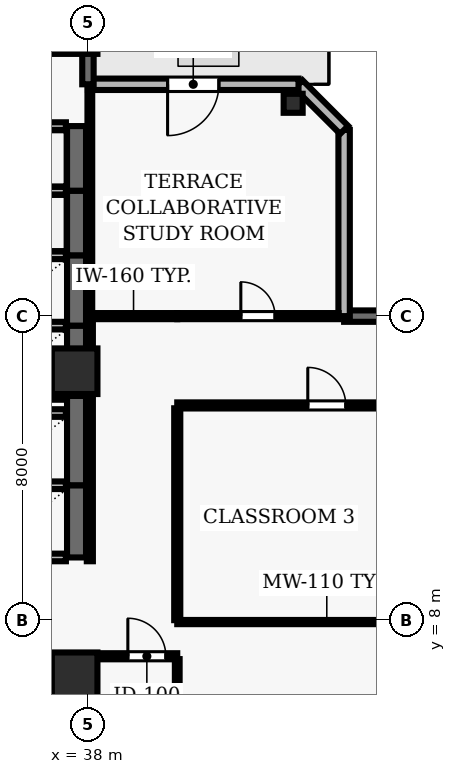
"""IFC4 building model, lengths in metres.
Left out: names, types, materials, properties, quantities, classifications, styles, units other than length and angle.
Written with IfcOpenShell. Run it as: python <this file> out.ifc"""

import sys

from ifc_helpers import new_model, si_unit, direction, frame, frame_2d, origin, origin_2d, place, context, subcontext, project, spatial, rectangle, hollow_rectangle, extrude, element, fill, save


model = new_model("IFC4")
c1 = context("Model", 3, precision=1e-05, world=origin(), true_north=direction((0.0, 1.0)))
c2 = subcontext(c1, "Body", "Model", "MODEL_VIEW")
j1 = project(units=[si_unit("LENGTHUNIT", "METRE"), si_unit("PLANEANGLEUNIT", "RADIAN")], contexts=[c1])
p1 = place(None, origin())
s1 = spatial("IfcSite", under=j1, at=p1, CompositionType="ELEMENT")
p2 = place(p1, origin())
s2 = spatial("IfcBuilding", under=s1, at=p2, CompositionType="ELEMENT")
p3 = place(p2, frame((0.0, 0.0, 158.0)))
s3 = spatial("IfcBuildingStorey", under=s2, at=p3, CompositionType="ELEMENT", Elevation=158.0)
for number, where, z_axis, x_axis in (
    (1, (37.65, 6.55, 0.0), (0.0, 0.0, 1.0), (1.0, 0.0, 0.0)),
    (2, (37.65, 14.55, 0.0), (0.0, 0.0, 1.0), (1.0, 0.0, 0.0)),
    (3, (37.65, 23.5, 0.0), (0.0, 0.0, 1.0), (1.0, 0.0, 0.0)),
):
    element("IfcColumn", number, at=place(p3, frame(where, z_axis=z_axis, x_axis=x_axis)), inside=s3, PredefinedType="COLUMN", context=c2, shape_type="SweptSolid", body=[
        extrude(rectangle(XDim=1.2, YDim=1.2, at=origin_2d()), origin(), (0.0, 0.0, 1.0), 3.9),
    ])
p4 = place(p3, frame((43.4, 21.6, 0.0), z_axis=(0.0, 0.0, 1.0), x_axis=(1.0, 0.0, 0.0)))
e4 = element("IfcColumn", 4, at=p4, inside=s3, PredefinedType="COLUMN", context=c2, shape_type="SweptSolid", body=[
    extrude(hollow_rectangle(XDim=0.5, YDim=0.5, WallThickness=0.025, at=origin_2d()), origin(), (0.0, 0.0, 1.0), 3.9),
])
p5 = place(p3, frame((68.1, 16.0, 0.0), z_axis=(0.0, 0.0, 1.0), x_axis=(-1.0, 0.0, 0.0)))
e5 = element("IfcWall", 5, at=p5, inside=s3, PredefinedType="SOLIDWALL", context=c2, shape_type="SweptSolid", body=[
    extrude(rectangle(XDim=23.359, YDim=0.3, at=frame_2d((11.68, 0.0))), origin(), (0.0, 0.0, 1.0), 3.69),
])
p6 = place(p5, frame((11.853, 0.0, 0.0)))
e6 = element("IfcOpeningElement", 6, at=p6, cuts=e5, PredefinedType="OPENING", context=c2, shape_type="SweptSolid", body=[
    extrude(rectangle(XDim=1.0, YDim=2.2, at=frame_2d((0.5, 1.1))), frame((0.0, 0.16, 0.0), z_axis=(0.0, -1.0, 0.0), x_axis=(1.0, 0.0, 0.0)), (0.0, 0.0, 1.0), 0.32),
])
p7 = place(p5, frame((2.02, 0.0, 0.9)))
e7 = element("IfcOpeningElement", 7, at=p7, cuts=e5, PredefinedType="OPENING", context=c2, shape_type="SweptSolid", body=[
    extrude(rectangle(XDim=1.8, YDim=1.8, at=frame_2d((0.9, 0.9))), frame((0.0, 0.16, 0.0), z_axis=(0.0, -1.0, 0.0), x_axis=(1.0, 0.0, 0.0)), (0.0, 0.0, 1.0), 0.32),
])
p8 = place(p5, frame((7.86, 0.0, 0.9)))
e8 = element("IfcOpeningElement", 8, at=p8, cuts=e5, PredefinedType="OPENING", context=c2, shape_type="SweptSolid", body=[
    extrude(rectangle(XDim=1.8, YDim=1.8, at=frame_2d((0.9, 0.9))), frame((0.0, 0.16, 0.0), z_axis=(0.0, -1.0, 0.0), x_axis=(1.0, 0.0, 0.0)), (0.0, 0.0, 1.0), 0.32),
])
p9 = place(p5, frame((13.699, 0.0, 0.9)))
e9 = element("IfcOpeningElement", 9, at=p9, cuts=e5, PredefinedType="OPENING", context=c2, shape_type="SweptSolid", body=[
    extrude(rectangle(XDim=1.8, YDim=1.8, at=frame_2d((0.9, 0.9))), frame((0.0, 0.16, 0.0), z_axis=(0.0, -1.0, 0.0), x_axis=(1.0, 0.0, 0.0)), (0.0, 0.0, 1.0), 0.32),
])
p10 = place(p5, frame((19.539, 0.0, 0.9)))
e10 = element("IfcOpeningElement", 10, at=p10, cuts=e5, PredefinedType="OPENING", context=c2, shape_type="SweptSolid", body=[
    extrude(rectangle(XDim=1.8, YDim=1.8, at=frame_2d((0.9, 0.9))), frame((0.0, 0.16, 0.0), z_axis=(0.0, -1.0, 0.0), x_axis=(1.0, 0.0, 0.0)), (0.0, 0.0, 1.0), 0.32),
])
p11 = place(p3, frame((44.741, 16.0, 0.0), z_axis=(0.0, 0.0, 1.0), x_axis=(0.0, 1.0, 0.0)))
e11 = element("IfcWall", 11, at=p11, inside=s3, PredefinedType="SOLIDWALL", context=c2, shape_type="SweptSolid", body=[
    extrude(rectangle(XDim=4.9, YDim=0.3, at=frame_2d((2.45, 0.0))), origin(), (0.0, 0.0, 1.0), 3.69),
])
p12 = place(p3, frame((44.741, 20.9, 0.0), z_axis=(0.0, 0.0, 1.0), x_axis=(-0.707034851297, 0.707178703759, 0.0)))
e12 = element("IfcWall", 12, at=p12, inside=s3, PredefinedType="SOLIDWALL", context=c2, shape_type="SweptSolid", body=[
    extrude(rectangle(XDim=1.697, YDim=0.3, at=frame_2d((0.849, 0.0))), origin(), (0.0, 0.0, 1.0), 3.69),
])
p13 = place(p3, frame((43.541, 22.1, 0.0), z_axis=(0.0, 0.0, 1.0), x_axis=(-1.0, 0.0, 0.0)))
e13 = element("IfcWall", 13, at=p13, inside=s3, PredefinedType="SOLIDWALL", context=c2, shape_type="SweptSolid", body=[
    extrude(rectangle(XDim=5.541, YDim=0.3, at=frame_2d((2.771, 0.0))), origin(), (0.0, 0.0, 1.0), 3.69),
])
p14 = place(p13, frame((2.095, 0.0, 0.0)))
e14 = element("IfcOpeningElement", 14, at=p14, cuts=e13, PredefinedType="OPENING", context=c2, shape_type="SweptSolid", body=[
    extrude(rectangle(XDim=1.35, YDim=2.2, at=frame_2d((0.675, 1.1))), frame((0.0, 0.16, 0.0), z_axis=(0.0, -1.0, 0.0), x_axis=(1.0, 0.0, 0.0)), (0.0, 0.0, 1.0), 0.32),
])
p15 = place(p3, frame((38.0, 22.1, 0.0), z_axis=(0.0, 0.0, 1.0), x_axis=(0.0, 1.0, 0.0)))
e15 = element("IfcWall", 15, at=p15, inside=s3, PredefinedType="SOLIDWALL", context=c2, shape_type="SweptSolid", body=[
    extrude(rectangle(XDim=24.0, YDim=0.3, at=frame_2d((12.0, 0.0))), origin(), (0.0, 0.0, 1.0), 3.69),
])
p16 = place(p15, frame((10.125, 0.0, 0.0)))
e16 = element("IfcOpeningElement", 16, at=p16, cuts=e15, PredefinedType="OPENING", context=c2, shape_type="SweptSolid", body=[
    extrude(rectangle(XDim=1.0, YDim=2.2, at=frame_2d((0.5, 1.1))), frame((0.0, 0.16, 0.0), z_axis=(0.0, -1.0, 0.0), x_axis=(1.0, 0.0, 0.0)), (0.0, 0.0, 1.0), 0.32),
])
p17 = place(p15, frame((14.25, 0.0, 0.9)))
e17 = element("IfcOpeningElement", 17, at=p17, cuts=e15, PredefinedType="OPENING", context=c2, shape_type="SweptSolid", body=[
    extrude(rectangle(XDim=2.4, YDim=2.2, at=frame_2d((1.2, 1.1))), frame((0.0, 0.16, 0.0), z_axis=(0.0, -1.0, 0.0), x_axis=(1.0, 0.0, 0.0)), (0.0, 0.0, 1.0), 0.32),
])
p18 = place(p15, frame((19.8, 0.0, 0.9)))
e18 = element("IfcOpeningElement", 18, at=p18, cuts=e15, PredefinedType="OPENING", context=c2, shape_type="SweptSolid", body=[
    extrude(rectangle(XDim=2.4, YDim=2.2, at=frame_2d((1.2, 1.1))), frame((0.0, 0.16, 0.0), z_axis=(0.0, -1.0, 0.0), x_axis=(1.0, 0.0, 0.0)), (0.0, 0.0, 1.0), 0.32),
])
p19 = place(p3, frame((37.7, 4.7, 0.0), z_axis=(0.0, 0.0, 1.0), x_axis=(0.0, 1.0, 0.0)))
e19 = element("IfcWall", 19, at=p19, inside=s3, PredefinedType="SHEAR", context=c2, shape_type="SweptSolid", body=[
    extrude(rectangle(XDim=2.25, YDim=0.5, at=frame_2d((1.125, 0.0))), origin(), (0.0, 0.0, 1.0), 3.69),
])
p20 = place(p3, frame((37.42, 6.95, 0.0), z_axis=(0.0, 0.0, 1.0), x_axis=(-1.0, 0.0, 0.0)))
e20 = element("IfcWall", 20, at=p20, inside=s3, PredefinedType="SOLIDWALL", context=c2, shape_type="SweptSolid", body=[
    extrude(rectangle(XDim=2.14, YDim=0.2, at=frame_2d((1.07, 0.0))), origin(), (0.0, 0.0, 1.0), 3.69),
])
p21 = place(p3, frame((37.7, 9.65, 0.0), z_axis=(0.0, 0.0, 1.0), x_axis=(0.0, 1.0, 0.0)))
e21 = element("IfcWall", 21, at=p21, inside=s3, PredefinedType="SHEAR", context=c2, shape_type="SweptSolid", body=[
    extrude(rectangle(XDim=1.9, YDim=0.5, at=frame_2d((0.95, 0.0))), origin(), (0.0, 0.0, 1.0), 3.69),
])
for number, where, z_axis, x_axis in (
    (22, (35.28, 9.65, 0.0), (0.0, 0.0, 1.0), (1.0, 0.0, 0.0)),
    (23, (37.42, 11.55, 0.0), (0.0, 0.0, 1.0), (-1.0, 0.0, 0.0)),
):
    element("IfcWall", number, at=place(p3, frame(where, z_axis=z_axis, x_axis=x_axis)), inside=s3, PredefinedType="SOLIDWALL", context=c2, shape_type="SweptSolid", body=[
        extrude(rectangle(XDim=2.14, YDim=0.2, at=frame_2d((1.07, 0.0))), origin(), (0.0, 0.0, 1.0), 3.69),
    ])
p22 = place(p3, frame((37.7, 11.55, 0.0), z_axis=(0.0, 0.0, 1.0), x_axis=(0.0, 1.0, 0.0)))
e24 = element("IfcWall", 24, at=p22, inside=s3, PredefinedType="SHEAR", context=c2, shape_type="SweptSolid", body=[
    extrude(rectangle(XDim=2.35, YDim=0.5, at=frame_2d((1.175, 0.0))), origin(), (0.0, 0.0, 1.0), 3.69),
])
p23 = place(p3, frame((37.42, 13.45, 0.0), z_axis=(0.0, 0.0, 1.0), x_axis=(-1.0, 0.0, 0.0)))
e25 = element("IfcWall", 25, at=p23, inside=s3, PredefinedType="SOLIDWALL", context=c2, shape_type="SweptSolid", body=[
    extrude(rectangle(XDim=2.14, YDim=0.2, at=frame_2d((1.07, 0.0))), origin(), (0.0, 0.0, 1.0), 3.69),
])
p24 = place(p3, frame((37.7, 13.9, 0.0), z_axis=(0.0, 0.0, 1.0), x_axis=(0.0, 1.0, 0.0)))
e26 = element("IfcWall", 26, at=p24, inside=s3, PredefinedType="SHEAR", context=c2, shape_type="SweptSolid", body=[
    extrude(rectangle(XDim=1.85, YDim=0.5, at=frame_2d((0.925, 0.0))), origin(), (0.0, 0.0, 1.0), 3.69),
])
for number, where, z_axis, x_axis in (
    (27, (35.28, 13.9, 0.0), (0.0, 0.0, 1.0), (1.0, 0.0, 0.0)),
    (28, (37.42, 15.75, 0.0), (0.0, 0.0, 1.0), (-1.0, 0.0, 0.0)),
):
    element("IfcWall", number, at=place(p3, frame(where, z_axis=z_axis, x_axis=x_axis)), inside=s3, PredefinedType="SOLIDWALL", context=c2, shape_type="SweptSolid", body=[
        extrude(rectangle(XDim=2.14, YDim=0.2, at=frame_2d((1.07, 0.0))), origin(), (0.0, 0.0, 1.0), 3.69),
    ])
p25 = place(p3, frame((37.7, 15.75, 0.0), z_axis=(0.0, 0.0, 1.0), x_axis=(0.0, 1.0, 0.0)))
e29 = element("IfcWall", 29, at=p25, inside=s3, PredefinedType="SHEAR", context=c2, shape_type="SweptSolid", body=[
    extrude(rectangle(XDim=1.85, YDim=0.5, at=frame_2d((0.925, 0.0))), origin(), (0.0, 0.0, 1.0), 3.69),
])
p26 = place(p3, frame((37.42, 17.6, 0.0), z_axis=(0.0, 0.0, 1.0), x_axis=(-1.0, 0.0, 0.0)))
e30 = element("IfcWall", 30, at=p26, inside=s3, PredefinedType="SOLIDWALL", context=c2, shape_type="SweptSolid", body=[
    extrude(rectangle(XDim=2.14, YDim=0.2, at=frame_2d((1.07, 0.0))), origin(), (0.0, 0.0, 1.0), 3.69),
])
p27 = place(p3, frame((37.7, 17.6, 0.0), z_axis=(0.0, 0.0, 1.0), x_axis=(0.0, 1.0, 0.0)))
e31 = element("IfcWall", 31, at=p27, inside=s3, PredefinedType="SHEAR", context=c2, shape_type="SweptSolid", body=[
    extrude(rectangle(XDim=1.7, YDim=0.5, at=frame_2d((0.85, 0.0))), origin(), (0.0, 0.0, 1.0), 3.69),
])
p28 = place(p3, frame((37.42, 19.3, 0.0), z_axis=(0.0, 0.0, 1.0), x_axis=(-1.0, 0.0, 0.0)))
e32 = element("IfcWall", 32, at=p28, inside=s3, PredefinedType="SOLIDWALL", context=c2, shape_type="SweptSolid", body=[
    extrude(rectangle(XDim=2.14, YDim=0.2, at=frame_2d((1.07, 0.0))), origin(), (0.0, 0.0, 1.0), 3.69),
])
p29 = place(p3, frame((37.7, 19.3, 0.0), z_axis=(0.0, 0.0, 1.0), x_axis=(0.0, 1.0, 0.0)))
e33 = element("IfcWall", 33, at=p29, inside=s3, PredefinedType="SHEAR", context=c2, shape_type="SweptSolid", body=[
    extrude(rectangle(XDim=1.7, YDim=0.5, at=frame_2d((0.85, 0.0))), origin(), (0.0, 0.0, 1.0), 3.69),
])
p30 = place(p3, frame((37.42, 21.0, 0.0), z_axis=(0.0, 0.0, 1.0), x_axis=(-1.0, 0.0, 0.0)))
e34 = element("IfcWall", 34, at=p30, inside=s3, PredefinedType="SOLIDWALL", context=c2, shape_type="SweptSolid", body=[
    extrude(rectangle(XDim=2.14, YDim=0.2, at=frame_2d((1.07, 0.0))), origin(), (0.0, 0.0, 1.0), 3.69),
])
p31 = place(p3, frame((38.05, 7.05, 0.0), z_axis=(0.0, 0.0, 1.0), x_axis=(1.0, 0.0, 0.0)))
e35 = element("IfcWall", 35, at=p31, inside=s3, PredefinedType="PARTITIONING", context=c2, shape_type="SweptSolid", body=[
    extrude(rectangle(XDim=2.3, YDim=0.16, at=frame_2d((1.15, 0.0))), origin(), (0.0, 0.0, 1.0), 3.69),
])
p32 = place(p31, frame((1.0, 0.0, 0.0)))
e36 = element("IfcOpeningElement", 36, at=p32, cuts=e35, PredefinedType="OPENING", context=c2, shape_type="SweptSolid", body=[
    extrude(rectangle(XDim=1.0, YDim=2.1, at=frame_2d((0.5, 1.05))), frame((0.0, 0.09, 0.0), z_axis=(0.0, -1.0, 0.0), x_axis=(1.0, 0.0, 0.0)), (0.0, 0.0, 1.0), 0.18),
])
p33 = place(p3, frame((40.35, 13.65, 0.0), z_axis=(0.0, 0.0, 1.0), x_axis=(1.0, 0.0, 0.0)))
e37 = element("IfcWall", 37, at=p33, inside=s3, PredefinedType="PARTITIONING", context=c2, shape_type="SweptSolid", body=[
    extrude(rectangle(XDim=7.87, YDim=0.16, at=frame_2d((3.935, 0.0))), origin(), (0.0, 0.0, 1.0), 3.69),
])
p34 = place(p33, frame((3.435, 0.0, 0.0)))
e38 = element("IfcOpeningElement", 38, at=p34, cuts=e37, PredefinedType="OPENING", context=c2, shape_type="SweptSolid", body=[
    extrude(rectangle(XDim=1.0, YDim=2.1, at=frame_2d((0.5, 1.05))), frame((0.0, 0.09, 0.0), z_axis=(0.0, -1.0, 0.0), x_axis=(1.0, 0.0, 0.0)), (0.0, 0.0, 1.0), 0.18),
])
p35 = place(p3, frame((40.35, 16.0, 0.0), z_axis=(0.0, 0.0, 1.0), x_axis=(-1.0, 0.0, 0.0)))
e39 = element("IfcWall", 39, at=p35, inside=s3, PredefinedType="PARTITIONING", context=c2, shape_type="SweptSolid", body=[
    extrude(rectangle(XDim=2.3, YDim=0.16, at=frame_2d((1.15, 0.0))), origin(), (0.0, 0.0, 1.0), 3.39),
])
p36 = place(p3, frame((40.35, 16.0, 0.0), z_axis=(0.0, 0.0, 1.0), x_axis=(1.0, 0.0, 0.0)))
e40 = element("IfcWall", 40, at=p36, inside=s3, PredefinedType="PARTITIONING", context=c2, shape_type="SweptSolid", body=[
    extrude(rectangle(XDim=4.246, YDim=0.16, at=frame_2d((2.123, 0.0))), origin(), (0.0, 0.0, 1.0), 3.39),
])
p37 = place(p36, frame((1.673, 0.0, 0.0)))
e41 = element("IfcOpeningElement", 41, at=p37, cuts=e40, PredefinedType="OPENING", context=c2, shape_type="SweptSolid", body=[
    extrude(rectangle(XDim=0.9, YDim=2.1, at=frame_2d((0.45, 1.05))), frame((0.0, 0.09, 0.0), z_axis=(0.0, -1.0, 0.0), x_axis=(1.0, 0.0, 0.0)), (0.0, 0.0, 1.0), 0.18),
])
p38 = place(p3, frame((48.22, 7.95, 0.0), z_axis=(0.0, 0.0, 1.0), x_axis=(-1.0, 0.0, 0.0)))
e42 = element("IfcWall", 42, at=p38, inside=s3, PredefinedType="MOVABLE", context=c2, shape_type="SweptSolid", body=[
    extrude(rectangle(XDim=7.87, YDim=0.11, at=frame_2d((3.935, 0.0))), origin(), (0.0, 0.0, 1.0), 3.074),
])
p39 = place(p3, frame((38.05, 6.975, 0.0), z_axis=(0.0, 0.0, 1.0), x_axis=(0.0, -1.0, 0.0)))
e43 = element("IfcWall", 43, at=p39, inside=s3, PredefinedType="PARTITIONING", context=c2, shape_type="SweptSolid", body=[
    extrude(rectangle(XDim=6.83, YDim=0.125, at=frame_2d((3.415, 0.0))), origin(), (0.0, 0.0, 1.0), 3.074),
])
p40 = place(p3, frame((38.05, 15.925, 0.0), z_axis=(0.0, 0.0, 1.0), x_axis=(0.0, -1.0, 0.0)))
e44 = element("IfcWall", 44, at=p40, inside=s3, PredefinedType="PARTITIONING", context=c2, shape_type="SweptSolid", body=[
    extrude(rectangle(XDim=6.375, YDim=0.16, at=frame_2d((3.188, 0.0))), origin(), (0.0, 0.0, 1.0), 3.074),
])
p41 = place(p3, frame((38.05, 21.955, 0.0), z_axis=(0.0, 0.0, 1.0), x_axis=(0.0, -1.0, 0.0)))
e45 = element("IfcWall", 45, at=p41, inside=s3, PredefinedType="PARTITIONING", context=c2, shape_type="SweptSolid", body=[
    extrude(rectangle(XDim=5.88, YDim=0.125, at=frame_2d((2.94, 0.0))), origin(), (0.0, 0.0, 1.0), 3.074),
])
p42 = place(p3, frame((40.35, 0.145, 0.0), z_axis=(0.0, 0.0, 1.0), x_axis=(0.0, 1.0, 0.0)))
e46 = element("IfcWall", 46, at=p42, inside=s3, PredefinedType="PARTITIONING", context=c2, shape_type="SweptSolid", body=[
    extrude(rectangle(XDim=6.83, YDim=0.125, at=frame_2d((3.415, 0.0))), origin(), (0.0, 0.0, 1.0), 3.69),
])
p43 = place(p42, frame((2.965, 0.0, 0.0)))
e47 = element("IfcOpeningElement", 47, at=p43, cuts=e46, PredefinedType="OPENING", context=c2, shape_type="SweptSolid", body=[
    extrude(rectangle(XDim=0.9, YDim=2.1, at=frame_2d((0.45, 1.05))), frame((0.0, 0.073, 0.0), z_axis=(0.0, -1.0, 0.0), x_axis=(1.0, 0.0, 0.0)), (0.0, 0.0, 1.0), 0.145),
])
p44 = place(p3, frame((40.35, 8.0, 0.0), z_axis=(0.0, 0.0, 1.0), x_axis=(0.0, 1.0, 0.0)))
e48 = element("IfcWall", 48, at=p44, inside=s3, PredefinedType="PARTITIONING", context=c2, shape_type="SweptSolid", body=[
    extrude(rectangle(XDim=5.575, YDim=0.16, at=frame_2d((2.788, 0.0))), origin(), (0.0, 0.0, 1.0), 3.69),
])
p45 = place(p14, origin())
e49 = element("IfcDoor", 49, at=p45, inside=s3, OperationType="SINGLE_SWING_RIGHT", PredefinedType="DOOR", context=c2, shape_type="SweptSolid", body=[
    extrude(rectangle(XDim=1.35, YDim=2.2, at=frame_2d((0.675, 1.1))), frame((0.0, 0.025, 0.0), z_axis=(0.0, -1.0, 0.0), x_axis=(1.0, 0.0, 0.0)), (0.0, 0.0, 1.0), 0.05),
])
fill(e14, e49)
p46 = place(p32, origin())
e50 = element("IfcDoor", 50, at=p46, inside=s3, OperationType="SINGLE_SWING_LEFT", PredefinedType="DOOR", context=c2, shape_type="SweptSolid", body=[
    extrude(rectangle(XDim=1.0, YDim=2.1, at=frame_2d((0.5, 1.05))), frame((0.0, 0.025, 0.0), z_axis=(0.0, -1.0, 0.0), x_axis=(1.0, 0.0, 0.0)), (0.0, 0.0, 1.0), 0.05),
])
fill(e36, e50)
p47 = place(p34, origin())
e51 = element("IfcDoor", 51, at=p47, inside=s3, OperationType="SINGLE_SWING_LEFT", PredefinedType="DOOR", context=c2, shape_type="SweptSolid", body=[
    extrude(rectangle(XDim=1.0, YDim=2.1, at=frame_2d((0.5, 1.05))), frame((0.0, 0.025, 0.0), z_axis=(0.0, -1.0, 0.0), x_axis=(1.0, 0.0, 0.0)), (0.0, 0.0, 1.0), 0.05),
])
fill(e38, e51)
p48 = place(p37, origin())
e52 = element("IfcDoor", 52, at=p48, inside=s3, OperationType="SINGLE_SWING_LEFT", PredefinedType="DOOR", context=c2, shape_type="SweptSolid", body=[
    extrude(rectangle(XDim=0.9, YDim=2.1, at=frame_2d((0.45, 1.05))), frame((0.0, 0.025, 0.0), z_axis=(0.0, -1.0, 0.0), x_axis=(1.0, 0.0, 0.0)), (0.0, 0.0, 1.0), 0.05),
])
fill(e41, e52)
save(model, sys.argv[1])
